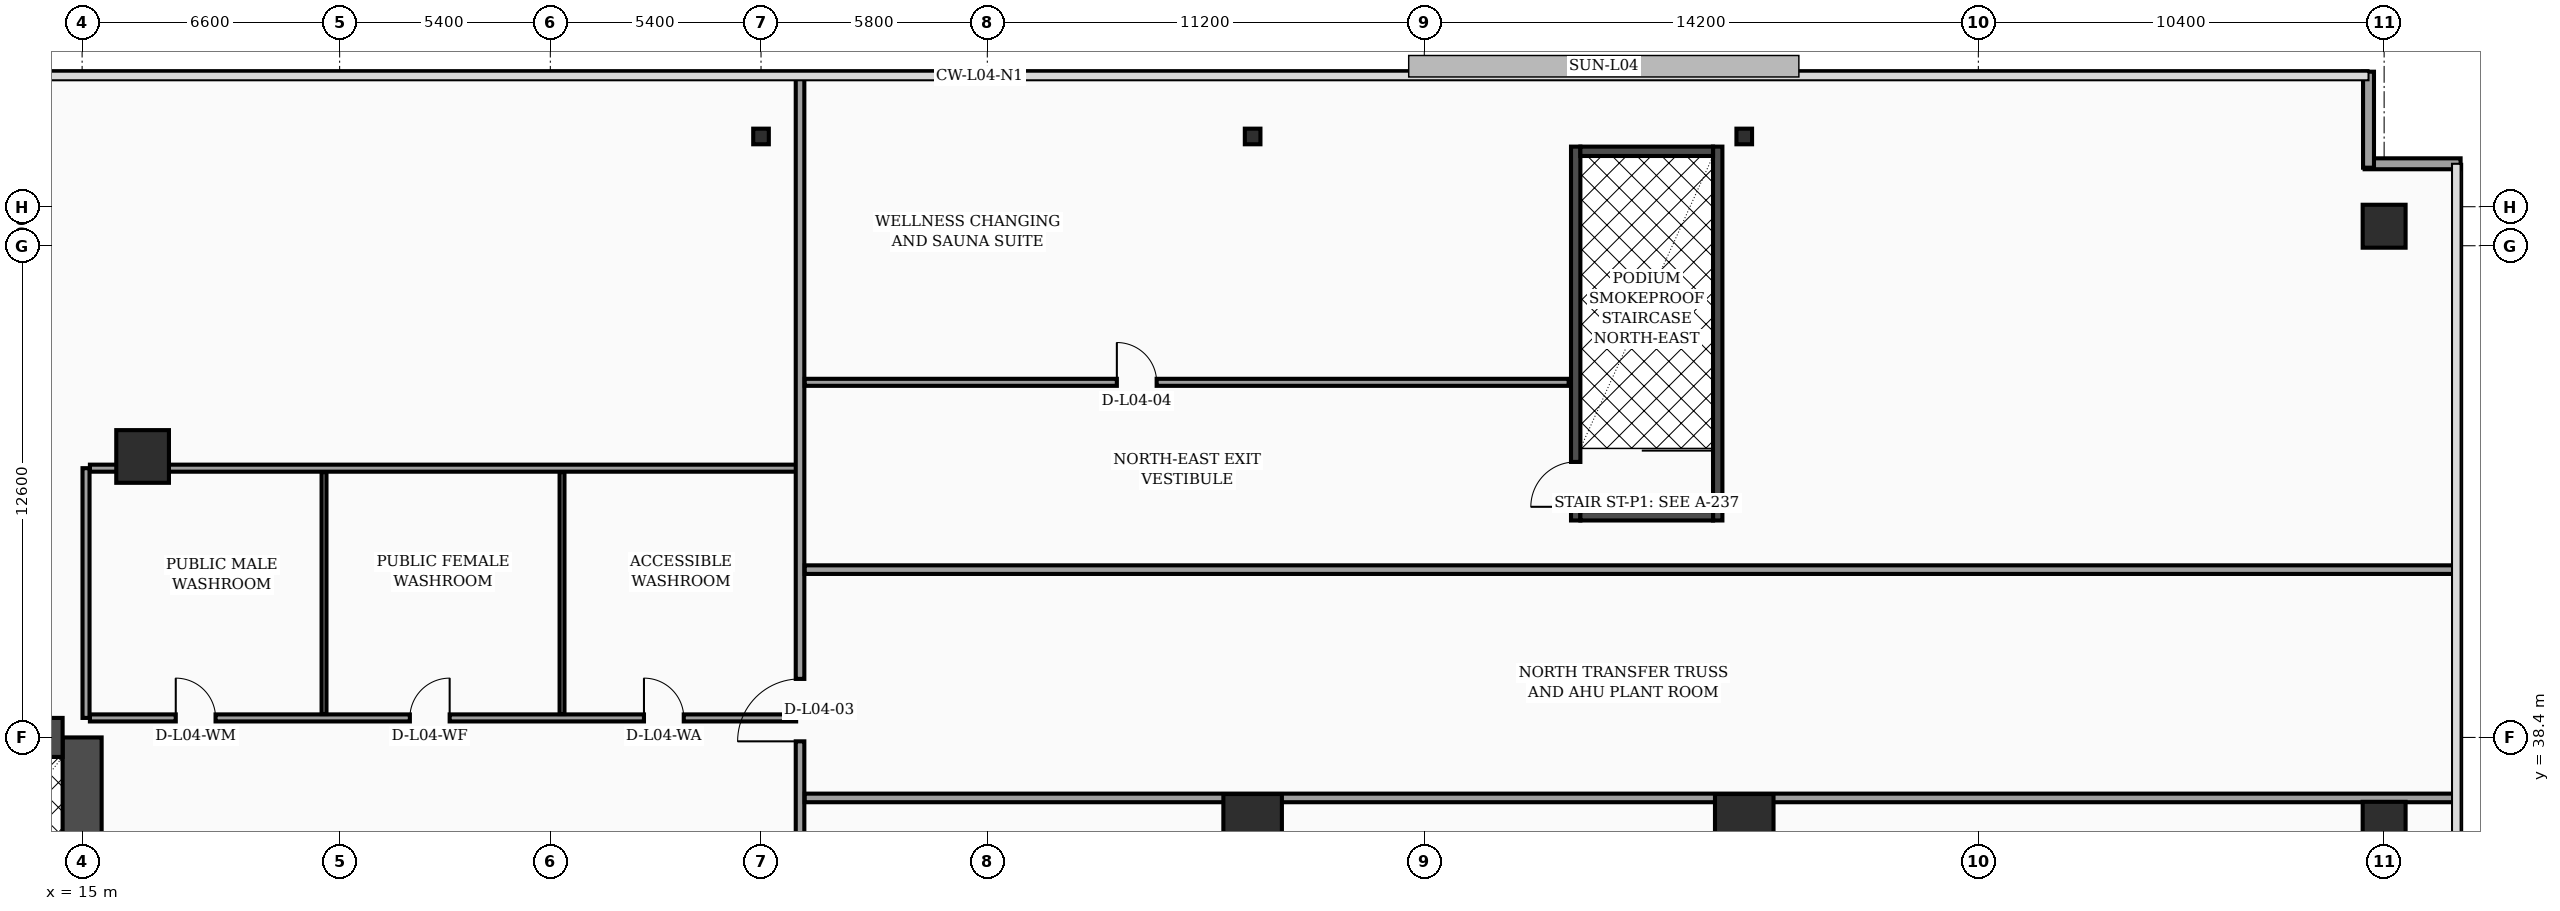
"""IFC4 building model, lengths in metres.
Left out: names, types, materials, properties, quantities, classifications, styles, units other than length and angle.
Written with IfcOpenShell. Run it as: python <this file> out.ifc"""

import sys

from ifc_helpers import new_model, si_unit, direction, frame, frame_2d, origin, origin_2d, place, context, subcontext, project, spatial, rectangle, hollow_rectangle, i_section, extrude, element, fill, save


model = new_model("IFC4")
c1 = context("Model", 3, precision=1e-05, world=origin(), true_north=direction((0.0, 1.0)))
c2 = subcontext(c1, "Body", "Model", "MODEL_VIEW")
j1 = project(units=[si_unit("LENGTHUNIT", "METRE"), si_unit("PLANEANGLEUNIT", "RADIAN")], contexts=[c1])
p1 = place(None, origin())
s1 = spatial("IfcSite", under=j1, at=p1, CompositionType="ELEMENT")
p2 = place(p1, origin())
s2 = spatial("IfcBuilding", under=s1, at=p2, CompositionType="ELEMENT")
p3 = place(p2, frame((0.0, 0.0, 22.0)))
s3 = spatial("IfcBuildingStorey", under=s2, at=p3, CompositionType="ELEMENT", Elevation=22.0)
p4 = place(p3, frame((15.0, 16.8, 0.0), z_axis=(0.0, 0.0, 1.0), x_axis=(0.0, 1.0, 0.0)))
e1 = element("IfcWall", 1, at=p4, inside=s3, PredefinedType="SHEAR", context=c2, shape_type="SweptSolid", body=[
    extrude(rectangle(XDim=21.6, YDim=1.0, at=frame_2d((10.8, 0.0))), origin(), (0.0, 0.0, 1.0), 4.76),
])
p5 = place(p4, frame((8.65, 0.0, 0.0)))
e2 = element("IfcOpeningElement", 2, at=p5, cuts=e1, PredefinedType="OPENING", context=c2, shape_type="SweptSolid", body=[
    extrude(rectangle(XDim=1.1, YDim=2.2, at=frame_2d((0.55, 1.1))), frame((0.0, 0.51, 0.0), z_axis=(0.0, -1.0, 0.0), x_axis=(1.0, 0.0, 0.0)), (0.0, 0.0, 1.0), 1.02),
])
p6 = place(p4, frame((1.25, 0.0, 0.0)))
e3 = element("IfcOpeningElement", 3, at=p6, cuts=e1, PredefinedType="OPENING", context=c2, shape_type="SweptSolid", body=[
    extrude(rectangle(XDim=1.1, YDim=2.2, at=frame_2d((0.55, 1.1))), frame((0.0, 0.51, 0.0), z_axis=(0.0, -1.0, 0.0), x_axis=(1.0, 0.0, 0.0)), (0.0, 0.0, 1.0), 1.02),
])
p7 = place(p4, frame((3.8, 0.0, 0.0)))
e4 = element("IfcOpeningElement", 4, at=p7, cuts=e1, PredefinedType="OPENING", context=c2, shape_type="SweptSolid", body=[
    extrude(rectangle(XDim=1.1, YDim=2.2, at=frame_2d((0.55, 1.1))), frame((0.0, 0.51, 0.0), z_axis=(0.0, -1.0, 0.0), x_axis=(1.0, 0.0, 0.0)), (0.0, 0.0, 1.0), 1.02),
])
p8 = place(p4, frame((6.35, 0.0, 0.0)))
e5 = element("IfcOpeningElement", 5, at=p8, cuts=e1, PredefinedType="OPENING", context=c2, shape_type="SweptSolid", body=[
    extrude(rectangle(XDim=1.1, YDim=2.2, at=frame_2d((0.55, 1.1))), frame((0.0, 0.51, 0.0), z_axis=(0.0, -1.0, 0.0), x_axis=(1.0, 0.0, 0.0)), (0.0, 0.0, 1.0), 1.02),
])
p9 = place(p3, frame((4.7, 38.4, 0.0), z_axis=(0.0, 0.0, 1.0), x_axis=(1.0, 0.0, 0.0)))
e6 = element("IfcWall", 6, at=p9, inside=s3, PredefinedType="SHEAR", context=c2, shape_type="SweptSolid", body=[
    extrude(rectangle(XDim=9.8, YDim=1.0, at=frame_2d((4.9, 0.0))), origin(), (0.0, 0.0, 1.0), 4.76),
])
p10 = place(p3, frame((53.28, 43.96, 0.0), z_axis=(0.0, 0.0, 1.0), x_axis=(0.0, 1.0, 0.0)))
e7 = element("IfcWall", 7, at=p10, inside=s3, PredefinedType="SOLIDWALL", context=c2, shape_type="SweptSolid", body=[
    extrude(rectangle(XDim=9.58, YDim=0.24, at=frame_2d((4.79, 0.0))), origin(), (0.0, 0.0, 1.0), 4.76),
])
p11 = place(p10, frame((0.35, 0.0, 0.0)))
e8 = element("IfcOpeningElement", 8, at=p11, cuts=e7, PredefinedType="OPENING", context=c2, shape_type="SweptSolid", body=[
    extrude(rectangle(XDim=1.15, YDim=2.2, at=frame_2d((0.575, 1.1))), frame((0.0, 0.13, 0.0), z_axis=(0.0, -1.0, 0.0), x_axis=(1.0, 0.0, 0.0)), (0.0, 0.0, 1.0), 0.26),
])
p12 = place(p3, frame((56.92, 43.96, 0.0), z_axis=(0.0, 0.0, 1.0), x_axis=(0.0, 1.0, 0.0)))
e9 = element("IfcWall", 9, at=p12, inside=s3, PredefinedType="SOLIDWALL", context=c2, shape_type="SweptSolid", body=[
    extrude(rectangle(XDim=9.58, YDim=0.24, at=frame_2d((4.79, 0.0))), origin(), (0.0, 0.0, 1.0), 4.76),
])
for number, where, z_axis, x_axis in (
    (10, (53.4, 44.08, 0.0), (0.0, 0.0, 1.0), (1.0, 0.0, 0.0)),
    (11, (53.4, 53.42, 0.0), (0.0, 0.0, 1.0), (1.0, 0.0, 0.0)),
):
    element("IfcWall", number, at=place(p3, frame(where, z_axis=z_axis, x_axis=x_axis)), inside=s3, PredefinedType="SOLIDWALL", context=c2, shape_type="SweptSolid", body=[
        extrude(rectangle(XDim=3.4, YDim=0.24, at=frame_2d((1.7, 0.0))), origin(), (0.0, 0.0, 1.0), 4.76),
    ])
p13 = place(p3, frame((16.55, 45.6, 0.0), z_axis=(0.0, 0.0, 1.0), x_axis=(1.0, 0.0, 0.0)))
e12 = element("IfcColumn", 12, at=p13, inside=s3, PredefinedType="COLUMN", context=c2, shape_type="SweptSolid", body=[
    extrude(rectangle(XDim=1.35, YDim=1.35, at=origin_2d()), origin(), (0.0, 0.0, 1.0), 4.76),
])
for number, where, z_axis, x_axis in (
    (13, (74.0, 36.2, 0.0), (0.0, 0.0, 1.0), (1.0, 0.0, 0.0)),
    (14, (74.0, 51.5, 0.0), (0.0, 0.0, 1.0), (1.0, 0.0, 0.0)),
):
    element("IfcColumn", number, at=place(p3, frame(where, z_axis=z_axis, x_axis=x_axis)), inside=s3, PredefinedType="COLUMN", context=c2, shape_type="SweptSolid", body=[
        extrude(hollow_rectangle(XDim=1.1, YDim=1.1, WallThickness=0.045, at=origin_2d()), origin(), (0.0, 0.0, 1.0), 4.76),
    ])
for number, where, z_axis, x_axis in (
    (15, (45.0, 36.2, 0.0), (0.0, 0.0, 1.0), (1.0, 0.0, 0.0)),
    (16, (57.6, 36.2, 0.0), (0.0, 0.0, 1.0), (1.0, 0.0, 0.0)),
):
    element("IfcColumn", number, at=place(p3, frame(where, z_axis=z_axis, x_axis=x_axis)), inside=s3, PredefinedType="COLUMN", context=c2, shape_type="SweptSolid", body=[
        extrude(rectangle(XDim=1.5, YDim=1.5, at=origin_2d()), origin(), (0.0, 0.0, 1.0), 4.76),
    ])
for number, where, z_axis, x_axis in (
    (17, (32.4, 53.8, 0.0), (0.0, 0.0, 1.0), (1.0, 0.0, 0.0)),
    (18, (45.0, 53.8, 0.0), (0.0, 0.0, 1.0), (1.0, 0.0, 0.0)),
    (19, (57.6, 53.8, 0.0), (0.0, 0.0, 1.0), (1.0, 0.0, 0.0)),
):
    element("IfcColumn", number, at=place(p3, frame(where, z_axis=z_axis, x_axis=x_axis)), inside=s3, PredefinedType="PILASTER", context=c2, shape_type="SweptSolid", body=[
        extrude(i_section(OverallWidth=0.4, OverallDepth=0.4, WebThickness=0.013, FlangeThickness=0.021, FilletRadius=0.022, at=origin_2d()), origin(), (0.0, 0.0, 1.0), 4.76),
    ])
for number, where, z_axis, x_axis in (
    (20, (75.96, 53.1, 0.0), (0.0, 0.0, 1.0), (-1.0, 0.0, 0.0)),
    (21, (73.6, 53.0, 0.0), (0.0, 0.0, 1.0), (0.0, 1.0, 0.0)),
):
    element("IfcWall", number, at=place(p3, frame(where, z_axis=z_axis, x_axis=x_axis)), inside=s3, PredefinedType="SOLIDWALL", context=c2, shape_type="SweptSolid", body=[
        extrude(rectangle(XDim=2.46, YDim=0.28, at=frame_2d((1.23, 0.0))), origin(), (0.0, 0.0, 1.0), 4.76),
    ])
p14 = place(p3, frame((15.2, 38.9, 0.0), z_axis=(0.0, 0.0, 1.0), x_axis=(1.0, 0.0, 0.0)))
e22 = element("IfcWall", 22, at=p14, inside=s3, PredefinedType="PARTITIONING", context=c2, shape_type="SweptSolid", body=[
    extrude(rectangle(XDim=18.1, YDim=0.18, at=frame_2d((9.05, 0.0))), origin(), (0.0, 0.0, 1.0), 3.94),
])
p15 = place(p14, frame((2.2, 0.0, 0.0)))
e23 = element("IfcOpeningElement", 23, at=p15, cuts=e22, PredefinedType="OPENING", context=c2, shape_type="SweptSolid", body=[
    extrude(rectangle(XDim=1.02, YDim=2.2, at=frame_2d((0.51, 1.1))), frame((0.0, 0.1, 0.0), z_axis=(0.0, -1.0, 0.0), x_axis=(1.0, 0.0, 0.0)), (0.0, 0.0, 1.0), 0.2),
])
p16 = place(p14, frame((8.2, 0.0, 0.0)))
e24 = element("IfcOpeningElement", 24, at=p16, cuts=e22, PredefinedType="OPENING", context=c2, shape_type="SweptSolid", body=[
    extrude(rectangle(XDim=1.02, YDim=2.2, at=frame_2d((0.51, 1.1))), frame((0.0, 0.1, 0.0), z_axis=(0.0, -1.0, 0.0), x_axis=(1.0, 0.0, 0.0)), (0.0, 0.0, 1.0), 0.2),
])
p17 = place(p14, frame((14.2, 0.0, 0.0)))
e25 = element("IfcOpeningElement", 25, at=p17, cuts=e22, PredefinedType="OPENING", context=c2, shape_type="SweptSolid", body=[
    extrude(rectangle(XDim=1.02, YDim=2.2, at=frame_2d((0.51, 1.1))), frame((0.0, 0.1, 0.0), z_axis=(0.0, -1.0, 0.0), x_axis=(1.0, 0.0, 0.0)), (0.0, 0.0, 1.0), 0.2),
])
p18 = place(p3, frame((15.2, 45.3, 0.0), z_axis=(0.0, 0.0, 1.0), x_axis=(1.0, 0.0, 0.0)))
e26 = element("IfcWall", 26, at=p18, inside=s3, PredefinedType="PARTITIONING", context=c2, shape_type="SweptSolid", body=[
    extrude(rectangle(XDim=18.1, YDim=0.18, at=frame_2d((9.05, 0.0))), origin(), (0.0, 0.0, 1.0), 3.94),
])
p19 = place(p3, frame((15.1, 38.9, 0.0), z_axis=(0.0, 0.0, 1.0), x_axis=(0.0, 1.0, 0.0)))
e27 = element("IfcWall", 27, at=p19, inside=s3, PredefinedType="PARTITIONING", context=c2, shape_type="SweptSolid", body=[
    extrude(rectangle(XDim=6.4, YDim=0.18, at=frame_2d((3.2, 0.0))), origin(), (0.0, 0.0, 1.0), 3.94),
])
p20 = place(p3, frame((21.2, 39.0, 0.0), z_axis=(0.0, 0.0, 1.0), x_axis=(0.0, 1.0, 0.0)))
e28 = element("IfcWall", 28, at=p20, inside=s3, PredefinedType="PARTITIONING", context=c2, shape_type="SweptSolid", body=[
    extrude(rectangle(XDim=6.2, YDim=0.125, at=frame_2d((3.1, 0.0))), origin(), (0.0, 0.0, 1.0), 3.94),
])
p21 = place(p3, frame((27.3, 39.0, 0.0), z_axis=(0.0, 0.0, 1.0), x_axis=(0.0, 1.0, 0.0)))
e29 = element("IfcWall", 29, at=p21, inside=s3, PredefinedType="PARTITIONING", context=c2, shape_type="SweptSolid", body=[
    extrude(rectangle(XDim=6.2, YDim=0.125, at=frame_2d((3.1, 0.0))), origin(), (0.0, 0.0, 1.0), 4.76),
])
p22 = place(p3, frame((33.4, 34.1, 0.0), z_axis=(0.0, 0.0, 1.0), x_axis=(0.0, 1.0, 0.0)))
e30 = element("IfcWall", 30, at=p22, inside=s3, PredefinedType="SOLIDWALL", context=c2, shape_type="SweptSolid", body=[
    extrude(rectangle(XDim=21.34, YDim=0.22, at=frame_2d((10.67, 0.0))), origin(), (0.0, 0.0, 1.0), 3.94),
])
p23 = place(p22, frame((4.2, 0.0, 0.0)))
e31 = element("IfcOpeningElement", 31, at=p23, cuts=e30, PredefinedType="OPENING", context=c2, shape_type="SweptSolid", body=[
    extrude(rectangle(XDim=1.6, YDim=2.35, at=frame_2d((0.8, 1.175))), frame((0.0, 0.12, 0.0), z_axis=(0.0, -1.0, 0.0), x_axis=(1.0, 0.0, 0.0)), (0.0, 0.0, 1.0), 0.24),
])
for number, where, z_axis, x_axis in (
    (32, (33.52, 36.85, 0.0), (0.0, 0.0, 1.0), (1.0, 0.0, 0.0)),
    (33, (33.52, 42.7, 0.0), (0.0, 0.0, 1.0), (1.0, 0.0, 0.0)),
):
    element("IfcWall", number, at=place(p3, frame(where, z_axis=z_axis, x_axis=x_axis)), inside=s3, PredefinedType="SOLIDWALL", context=c2, shape_type="SweptSolid", body=[
        extrude(rectangle(XDim=42.36, YDim=0.22, at=frame_2d((21.18, 0.0))), origin(), (0.0, 0.0, 1.0), 3.94),
    ])
p24 = place(p3, frame((33.52, 47.5, 0.0), z_axis=(0.0, 0.0, 1.0), x_axis=(1.0, 0.0, 0.0)))
e34 = element("IfcWall", 34, at=p24, inside=s3, PredefinedType="PARTITIONING", context=c2, shape_type="SweptSolid", body=[
    extrude(rectangle(XDim=19.58, YDim=0.18, at=frame_2d((9.79, 0.0))), origin(), (0.0, 0.0, 1.0), 3.94),
])
p25 = place(p24, frame((8.0, 0.0, 0.0)))
e35 = element("IfcOpeningElement", 35, at=p25, cuts=e34, PredefinedType="OPENING", context=c2, shape_type="SweptSolid", body=[
    extrude(rectangle(XDim=1.02, YDim=2.2, at=frame_2d((0.51, 1.1))), frame((0.0, 0.1, 0.0), z_axis=(0.0, -1.0, 0.0), x_axis=(1.0, 0.0, 0.0)), (0.0, 0.0, 1.0), 0.2),
])
p26 = place(p15, origin())
e36 = element("IfcDoor", 36, at=p26, inside=s3, OperationType="SINGLE_SWING_LEFT", PredefinedType="DOOR", context=c2, shape_type="SweptSolid", body=[
    extrude(rectangle(XDim=1.02, YDim=2.2, at=frame_2d((0.51, 1.1))), frame((0.0, 0.025, 0.0), z_axis=(0.0, -1.0, 0.0), x_axis=(1.0, 0.0, 0.0)), (0.0, 0.0, 1.0), 0.05),
])
fill(e23, e36)
p27 = place(p16, origin())
e37 = element("IfcDoor", 37, at=p27, inside=s3, OperationType="SINGLE_SWING_RIGHT", PredefinedType="DOOR", context=c2, shape_type="SweptSolid", body=[
    extrude(rectangle(XDim=1.02, YDim=2.2, at=frame_2d((0.51, 1.1))), frame((0.0, 0.025, 0.0), z_axis=(0.0, -1.0, 0.0), x_axis=(1.0, 0.0, 0.0)), (0.0, 0.0, 1.0), 0.05),
])
fill(e24, e37)
p28 = place(p17, origin())
e38 = element("IfcDoor", 38, at=p28, inside=s3, OperationType="SINGLE_SWING_LEFT", PredefinedType="DOOR", context=c2, shape_type="SweptSolid", body=[
    extrude(rectangle(XDim=1.02, YDim=2.2, at=frame_2d((0.51, 1.1))), frame((0.0, 0.025, 0.0), z_axis=(0.0, -1.0, 0.0), x_axis=(1.0, 0.0, 0.0)), (0.0, 0.0, 1.0), 0.05),
])
fill(e25, e38)
p29 = place(p23, origin())
e39 = element("IfcDoor", 39, at=p29, inside=s3, OperationType="SINGLE_SWING_LEFT", PredefinedType="DOOR", context=c2, shape_type="SweptSolid", body=[
    extrude(rectangle(XDim=1.6, YDim=2.35, at=frame_2d((0.8, 1.175))), frame((0.0, 0.025, 0.0), z_axis=(0.0, -1.0, 0.0), x_axis=(1.0, 0.0, 0.0)), (0.0, 0.0, 1.0), 0.05),
])
fill(e31, e39)
p30 = place(p25, origin())
e40 = element("IfcDoor", 40, at=p30, inside=s3, OperationType="SINGLE_SWING_LEFT", PredefinedType="DOOR", context=c2, shape_type="SweptSolid", body=[
    extrude(rectangle(XDim=1.02, YDim=2.2, at=frame_2d((0.51, 1.1))), frame((0.0, 0.025, 0.0), z_axis=(0.0, -1.0, 0.0), x_axis=(1.0, 0.0, 0.0)), (0.0, 0.0, 1.0), 0.05),
])
fill(e35, e40)
p31 = place(p11, origin())
e41 = element("IfcDoor", 41, at=p31, inside=s3, OperationType="SINGLE_SWING_LEFT", PredefinedType="DOOR", context=c2, shape_type="SweptSolid", body=[
    extrude(rectangle(XDim=1.15, YDim=2.2, at=frame_2d((0.575, 1.1))), frame((0.0, 0.025, 0.0), z_axis=(0.0, -1.0, 0.0), x_axis=(1.0, 0.0, 0.0)), (0.0, 0.0, 1.0), 0.05),
])
fill(e8, e41)
save(model, sys.argv[1])
